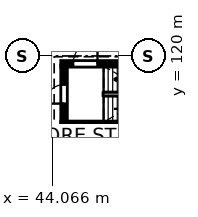
"""IFC4 building model, lengths in metres.
Left out: names, types, materials, properties, quantities, classifications, styles, units other than length and angle.
Written with IfcOpenShell. Run it as: python <this file> out.ifc"""

import sys

from ifc_helpers import new_model, si_unit, direction, frame, frame_2d, origin, place, context, subcontext, project, spatial, rectangle, extrude, element, fill, save


model = new_model("IFC4")
c1 = context("Model", 3, precision=1e-05, world=origin(), true_north=direction((0.0, 1.0)))
c2 = subcontext(c1, "Body", "Model", "MODEL_VIEW")
j1 = project(units=[si_unit("LENGTHUNIT", "METRE"), si_unit("PLANEANGLEUNIT", "RADIAN")], contexts=[c1])
p1 = place(None, origin())
s1 = spatial("IfcSite", under=j1, at=p1, CompositionType="ELEMENT")
p2 = place(p1, origin())
s2 = spatial("IfcBuilding", under=s1, at=p2, CompositionType="ELEMENT")
p3 = place(p2, origin())
s3 = spatial("IfcBuildingStorey", under=s2, at=p3, CompositionType="ELEMENT", Elevation=0.0)
p4 = place(p3, frame((54.1, 115.5, 0.0), z_axis=(0.0, 0.0, 1.0), x_axis=(-1.0, 0.0, 0.0)))
e1 = element("IfcWall", 1, at=p4, inside=s3, PredefinedType="SOLIDWALL", context=c2, shape_type="SweptSolid", body=[
    extrude(rectangle(XDim=9.4, YDim=0.3, at=frame_2d((4.7, 0.0))), origin(), (0.0, 0.0, 1.0), 5.16),
])
p5 = place(p3, frame((44.7, 119.48, 0.0), z_axis=(0.0, 0.0, 1.0), x_axis=(1.0, 0.0, 0.0)))
e2 = element("IfcWall", 2, at=p5, inside=s3, PredefinedType="SOLIDWALL", context=c2, shape_type="SweptSolid", body=[
    extrude(rectangle(XDim=9.4, YDim=0.3, at=frame_2d((4.7, 0.0))), origin(), (0.0, 0.0, 1.0), 5.16),
])
p6 = place(p5, frame((0.75, 0.0, 0.0)))
e3 = element("IfcOpeningElement", 3, at=p6, cuts=e2, PredefinedType="OPENING", context=c2, shape_type="SweptSolid", body=[
    extrude(rectangle(XDim=1.6, YDim=2.15, at=frame_2d((0.8, 1.075))), frame((0.0, 0.16, 0.0), z_axis=(0.0, -1.0, 0.0), x_axis=(1.0, 0.0, 0.0)), (0.0, 0.0, 1.0), 0.32),
])
p7 = place(p3, frame((44.85, 115.65, 0.0), z_axis=(0.0, 0.0, 1.0), x_axis=(0.0, 1.0, 0.0)))
e4 = element("IfcWall", 4, at=p7, inside=s3, PredefinedType="SOLIDWALL", context=c2, shape_type="SweptSolid", body=[
    extrude(rectangle(XDim=3.68, YDim=0.3, at=frame_2d((1.84, 0.0))), origin(), (0.0, 0.0, 1.0), 5.16),
])
p8 = place(p7, frame((1.215, 0.0, 0.0)))
e5 = element("IfcOpeningElement", 5, at=p8, cuts=e4, PredefinedType="OPENING", context=c2, shape_type="SweptSolid", body=[
    extrude(rectangle(XDim=1.25, YDim=2.2, at=frame_2d((0.625, 1.1))), frame((0.0, 0.16, 0.0), z_axis=(0.0, -1.0, 0.0), x_axis=(1.0, 0.0, 0.0)), (0.0, 0.0, 1.0), 0.32),
])
p9 = place(p6, origin())
e6 = element("IfcDoor", 6, at=p9, inside=s3, OperationType="SINGLE_SWING_RIGHT", PredefinedType="DOOR", context=c2, shape_type="SweptSolid", body=[
    extrude(rectangle(XDim=1.6, YDim=2.15, at=frame_2d((0.8, 1.075))), frame((0.0, 0.025, 0.0), z_axis=(0.0, -1.0, 0.0), x_axis=(1.0, 0.0, 0.0)), (0.0, 0.0, 1.0), 0.05),
])
fill(e3, e6)
p10 = place(p8, origin())
e7 = element("IfcDoor", 7, at=p10, inside=s3, OperationType="SINGLE_SWING_LEFT", PredefinedType="DOOR", context=c2, shape_type="SweptSolid", body=[
    extrude(rectangle(XDim=1.25, YDim=2.2, at=frame_2d((0.625, 1.1))), frame((0.0, 0.025, 0.0), z_axis=(0.0, -1.0, 0.0), x_axis=(1.0, 0.0, 0.0)), (0.0, 0.0, 1.0), 0.05),
])
fill(e5, e7)
save(model, sys.argv[1])
